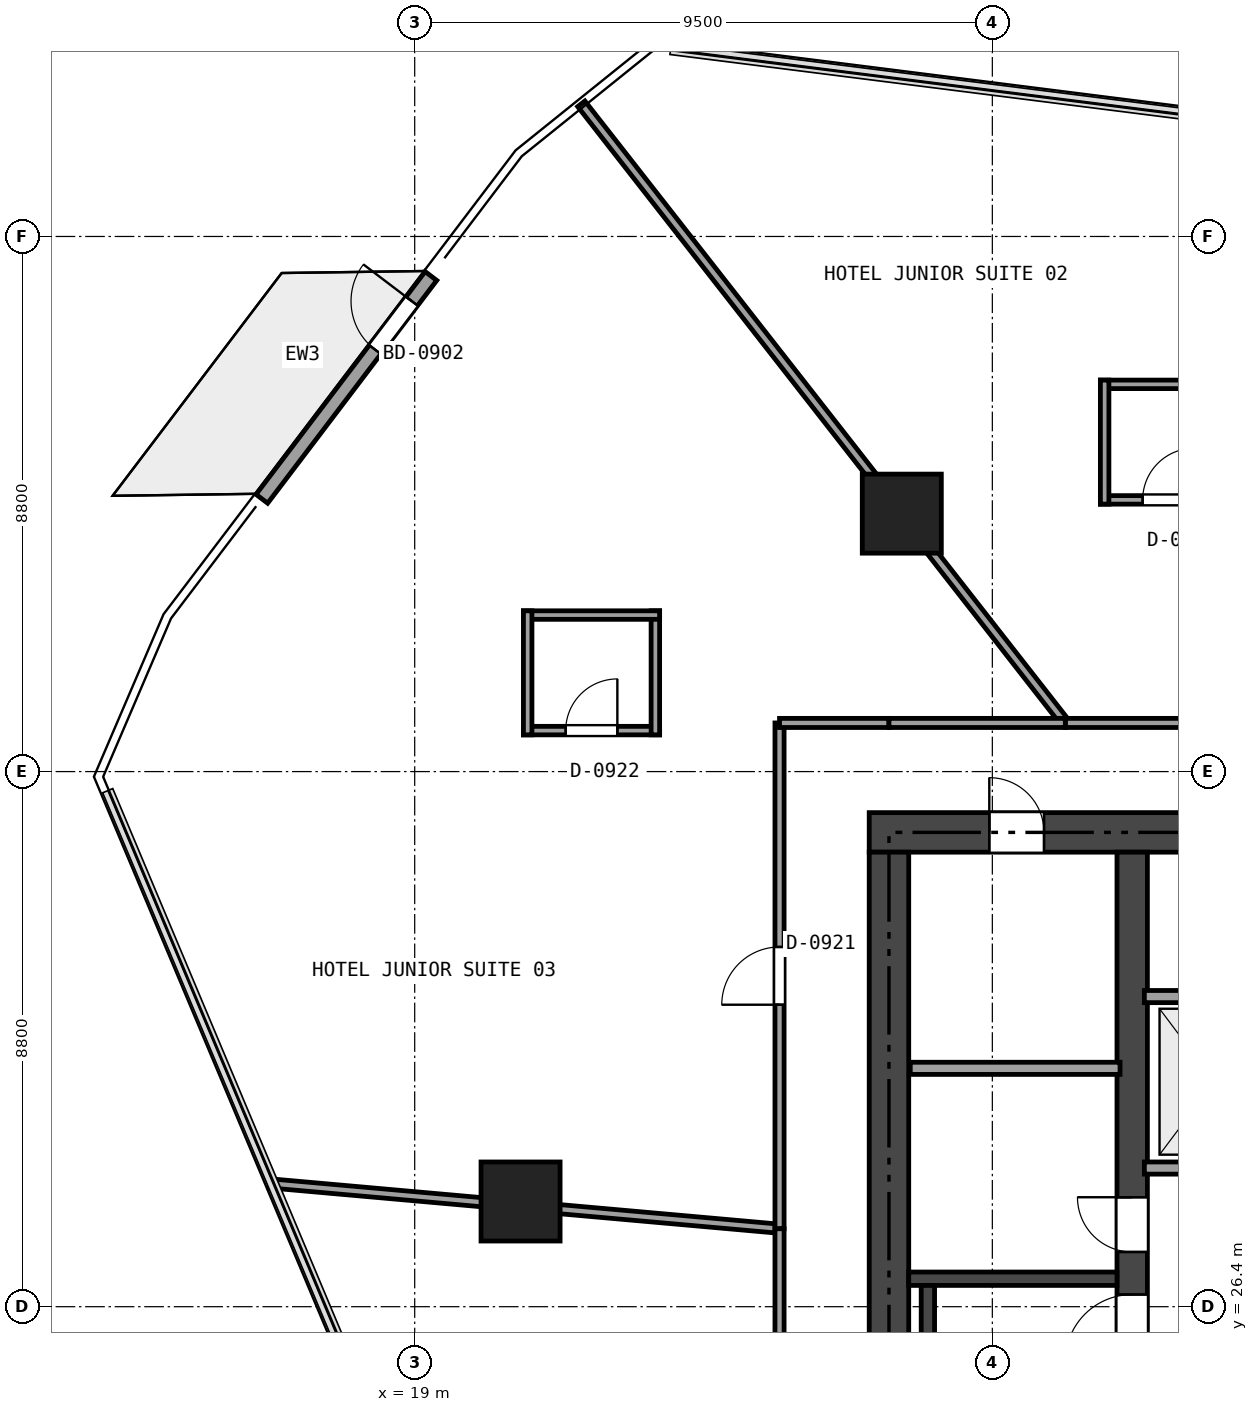
"""IFC4 building model, lengths in metres.
Left out: names, types, materials, properties, quantities, classifications, styles, units other than length and angle.
Written with IfcOpenShell. Run it as: python <this file> out.ifc"""

import sys

from ifc_helpers import new_model, si_unit, direction, frame, frame_2d, origin, origin_2d, place, context, subcontext, project, spatial, rectangle, extrude, element, fill, save


model = new_model("IFC4")
c1 = context("Model", 3, precision=1e-05, world=origin(), true_north=direction((0.0, 1.0)))
c2 = subcontext(c1, "Body", "Model", "MODEL_VIEW")
j1 = project(units=[si_unit("LENGTHUNIT", "METRE"), si_unit("PLANEANGLEUNIT", "RADIAN")], contexts=[c1])
p1 = place(None, origin())
s1 = spatial("IfcSite", under=j1, at=p1, CompositionType="ELEMENT")
p2 = place(p1, origin())
s2 = spatial("IfcBuilding", under=s1, at=p2, CompositionType="ELEMENT")
p3 = place(p2, frame((0.0, 0.0, 40.8)))
s3 = spatial("IfcBuildingStorey", under=s2, at=p3, CompositionType="ELEMENT", Elevation=40.8)
p4 = place(p3, frame((26.475, 34.2, 0.0), z_axis=(0.0, 0.0, 1.0), x_axis=(1.0, 0.0, 0.0)))
e1 = element("IfcWall", 1, at=p4, inside=s3, PredefinedType="SHEAR", context=c2, shape_type="SweptSolid", body=[
    extrude(rectangle(XDim=21.45, YDim=0.65, at=frame_2d((10.725, 0.0))), origin(), (0.0, 0.0, 1.0), 3.17),
])
p5 = place(p4, frame((9.725, 0.0, 0.0)))
e2 = element("IfcOpeningElement", 2, at=p5, cuts=e1, PredefinedType="OPENING", context=c2, shape_type="SweptSolid", body=[
    extrude(rectangle(XDim=1.1, YDim=2.15, at=frame_2d((0.55, 1.075))), frame((0.0, 0.335, 0.0), z_axis=(0.0, -1.0, 0.0), x_axis=(1.0, 0.0, 0.0)), (0.0, 0.0, 1.0), 0.67),
])
p6 = place(p4, frame((1.975, 0.0, 0.0)))
e3 = element("IfcOpeningElement", 3, at=p6, cuts=e1, PredefinedType="OPENING", context=c2, shape_type="SweptSolid", body=[
    extrude(rectangle(XDim=0.9, YDim=2.1, at=frame_2d((0.45, 1.05))), frame((0.0, 0.335, 0.0), z_axis=(0.0, -1.0, 0.0), x_axis=(1.0, 0.0, 0.0)), (0.0, 0.0, 1.0), 0.67),
])
p7 = place(p4, frame((6.275, 0.0, 0.0)))
e4 = element("IfcOpeningElement", 4, at=p7, cuts=e1, PredefinedType="OPENING", context=c2, shape_type="SweptSolid", body=[
    extrude(rectangle(XDim=0.9, YDim=2.1, at=frame_2d((0.45, 1.05))), frame((0.0, 0.335, 0.0), z_axis=(0.0, -1.0, 0.0), x_axis=(1.0, 0.0, 0.0)), (0.0, 0.0, 1.0), 0.67),
])
p8 = place(p3, frame((26.8, 18.925, 0.0), z_axis=(0.0, 0.0, 1.0), x_axis=(0.0, 1.0, 0.0)))
e5 = element("IfcWall", 5, at=p8, inside=s3, PredefinedType="SHEAR", context=c2, shape_type="SweptSolid", body=[
    extrude(rectangle(XDim=14.95, YDim=0.65, at=frame_2d((7.475, 0.0))), origin(), (0.0, 0.0, 1.0), 3.17),
])
p9 = place(p3, frame((30.8, 18.925, 0.0), z_axis=(0.0, 0.0, 1.0), x_axis=(0.0, 1.0, 0.0)))
e6 = element("IfcWall", 6, at=p9, inside=s3, PredefinedType="SHEAR", context=c2, shape_type="SweptSolid", body=[
    extrude(rectangle(XDim=14.95, YDim=0.5, at=frame_2d((7.475, 0.0))), origin(), (0.0, 0.0, 1.0), 3.17),
])
p10 = place(p9, frame((6.575, 0.0, 0.0)))
e7 = element("IfcOpeningElement", 7, at=p10, cuts=e6, PredefinedType="OPENING", context=c2, shape_type="SweptSolid", body=[
    extrude(rectangle(XDim=1.1, YDim=2.15, at=frame_2d((0.55, 1.075))), frame((0.0, 0.26, 0.0), z_axis=(0.0, -1.0, 0.0), x_axis=(1.0, 0.0, 0.0)), (0.0, 0.0, 1.0), 0.52),
])
p11 = place(p9, frame((8.375, 0.0, 0.0)))
e8 = element("IfcOpeningElement", 8, at=p11, cuts=e6, PredefinedType="OPENING", context=c2, shape_type="SweptSolid", body=[
    extrude(rectangle(XDim=0.9, YDim=2.1, at=frame_2d((0.45, 1.05))), frame((0.0, 0.26, 0.0), z_axis=(0.0, -1.0, 0.0), x_axis=(1.0, 0.0, 0.0)), (0.0, 0.0, 1.0), 0.52),
])
p12 = place(p3, frame((27.125, 26.86, 0.0), z_axis=(0.0, 0.0, 1.0), x_axis=(1.0, 0.0, 0.0)))
e9 = element("IfcWall", 9, at=p12, inside=s3, PredefinedType="SHEAR", context=c2, shape_type="SweptSolid", body=[
    extrude(rectangle(XDim=3.425, YDim=0.22, at=frame_2d((1.712, 0.0))), origin(), (0.0, 0.0, 1.0), 3.17),
])
p13 = place(p3, frame((27.44, 19.35, 0.0), z_axis=(0.0, 0.0, 1.0), x_axis=(0.0, 1.0, 0.0)))
e10 = element("IfcWall", 10, at=p13, inside=s3, PredefinedType="SHEAR", context=c2, shape_type="SweptSolid", body=[
    extrude(rectangle(XDim=7.4, YDim=0.22, at=frame_2d((3.7, 0.0))), origin(), (0.0, 0.0, 1.0), 3.17),
])
for number, where, z_axis, x_axis in (
    (11, (27.011, 39.442, 0.0), (0.0, 0.0, 1.0), (1.0, 0.0, 0.0)),
    (12, (20.741, 28.13, 0.0), (0.0, 0.0, 1.0), (1.0, 0.0, 0.0)),
):
    element("IfcColumn", number, at=place(p3, frame(where, z_axis=z_axis, x_axis=x_axis)), inside=s3, PredefinedType="COLUMN", context=c2, shape_type="SweptSolid", body=[
        extrude(rectangle(XDim=1.3, YDim=1.3, at=origin_2d()), origin(), (0.0, 0.0, 1.0), 3.17),
    ])
p14 = place(p3, frame((16.486, 39.686, 0.0), z_axis=(0.0, 0.0, 1.0), x_axis=(0.604575811397, 0.79654760578, 0.0)))
e13 = element("IfcWall", 13, at=p14, inside=s3, PredefinedType="SOLIDWALL", context=c2, shape_type="SweptSolid", body=[
    extrude(rectangle(XDim=4.6, YDim=0.24, at=frame_2d((2.3, 0.0))), origin(), (0.0, 0.0, 1.0), 3.17),
])
p15 = place(p14, frame((3.08, 0.0, 0.0)))
e14 = element("IfcOpeningElement", 14, at=p15, cuts=e13, PredefinedType="OPENING", context=c2, shape_type="SweptSolid", body=[
    extrude(rectangle(XDim=1.0, YDim=2.15, at=frame_2d((0.5, 1.075))), frame((0.0, 0.13, 0.0), z_axis=(0.0, -1.0, 0.0), x_axis=(1.0, 0.0, 0.0)), (0.0, 0.0, 1.0), 0.26),
])
p16 = place(p3, frame((27.15, 30.32, 0.0), z_axis=(0.0, 0.0, 1.0), x_axis=(1.0, 0.0, 0.0)))
e15 = element("IfcWall", 15, at=p16, inside=s3, PredefinedType="SOLIDWALL", context=c2, shape_type="SweptSolid", body=[
    extrude(rectangle(XDim=3.45, YDim=0.2, at=frame_2d((1.725, 0.0))), origin(), (0.0, 0.0, 1.0), 3.17),
])
p17 = place(p3, frame((31.0, 28.68, 0.0), z_axis=(0.0, 0.0, 1.0), x_axis=(1.0, 0.0, 0.0)))
e16 = element("IfcWall", 16, at=p17, inside=s3, PredefinedType="SOLIDWALL", context=c2, shape_type="SweptSolid", body=[
    extrude(rectangle(XDim=4.42, YDim=0.2, at=frame_2d((2.21, 0.0))), origin(), (0.0, 0.0, 1.0), 3.17),
])
p18 = place(p17, frame((0.6, 0.0, 0.0)))
e17 = element("IfcOpeningElement", 17, at=p18, cuts=e16, PredefinedType="OPENING", context=c2, shape_type="SweptSolid", body=[
    extrude(rectangle(XDim=1.1, YDim=2.15, at=frame_2d((0.55, 1.075))), frame((0.0, 0.11, 0.0), z_axis=(0.0, -1.0, 0.0), x_axis=(1.0, 0.0, 0.0)), (0.0, 0.0, 1.0), 0.22),
])
p19 = place(p17, frame((2.85, 0.0, 0.0)))
e18 = element("IfcOpeningElement", 18, at=p19, cuts=e16, PredefinedType="OPENING", context=c2, shape_type="SweptSolid", body=[
    extrude(rectangle(XDim=1.1, YDim=2.15, at=frame_2d((0.55, 1.075))), frame((0.0, 0.11, 0.0), z_axis=(0.0, -1.0, 0.0), x_axis=(1.0, 0.0, 0.0)), (0.0, 0.0, 1.0), 0.22),
])
p20 = place(p3, frame((31.0, 31.5, 0.0), z_axis=(0.0, 0.0, 1.0), x_axis=(1.0, 0.0, 0.0)))
e19 = element("IfcWall", 19, at=p20, inside=s3, PredefinedType="SOLIDWALL", context=c2, shape_type="SweptSolid", body=[
    extrude(rectangle(XDim=4.42, YDim=0.2, at=frame_2d((2.21, 0.0))), origin(), (0.0, 0.0, 1.0), 3.17),
])
p21 = place(p3, frame((30.277, 39.668, 0.0), z_axis=(0.0, 0.0, 1.0), x_axis=(1.0, 0.0, 0.0)))
e20 = element("IfcWall", 20, at=p21, inside=s3, PredefinedType="PARTITIONING", context=c2, shape_type="SweptSolid", body=[
    extrude(rectangle(XDim=2.24, YDim=0.14, at=frame_2d((1.12, 0.0))), origin(), (0.0, 0.0, 1.0), 3.17),
])
p22 = place(p21, frame((0.695, 0.0, 0.0)))
e21 = element("IfcOpeningElement", 21, at=p22, cuts=e20, PredefinedType="OPENING", context=c2, shape_type="SweptSolid", body=[
    extrude(rectangle(XDim=0.85, YDim=2.1, at=frame_2d((0.425, 1.05))), frame((0.0, 0.08, 0.0), z_axis=(0.0, -1.0, 0.0), x_axis=(1.0, 0.0, 0.0)), (0.0, 0.0, 1.0), 0.16),
])
p23 = place(p3, frame((32.517, 41.568, 0.0), z_axis=(0.0, 0.0, 1.0), x_axis=(-1.0, 0.0, 0.0)))
e22 = element("IfcWall", 22, at=p23, inside=s3, PredefinedType="PARTITIONING", context=c2, shape_type="SweptSolid", body=[
    extrude(rectangle(XDim=2.24, YDim=0.14, at=frame_2d((1.12, 0.0))), origin(), (0.0, 0.0, 1.0), 2.355),
])
p24 = place(p3, frame((30.347, 41.638, 0.0), z_axis=(0.0, 0.0, 1.0), x_axis=(0.0, -1.0, 0.0)))
e23 = element("IfcWall", 23, at=p24, inside=s3, PredefinedType="PARTITIONING", context=c2, shape_type="SweptSolid", body=[
    extrude(rectangle(XDim=2.04, YDim=0.14, at=frame_2d((1.02, 0.0))), origin(), (0.0, 0.0, 1.0), 2.355),
])
p25 = place(p3, frame((20.788, 35.874, 0.0), z_axis=(0.0, 0.0, 1.0), x_axis=(1.0, 0.0, 0.0)))
e24 = element("IfcWall", 24, at=p25, inside=s3, PredefinedType="PARTITIONING", context=c2, shape_type="SweptSolid", body=[
    extrude(rectangle(XDim=2.24, YDim=0.14, at=frame_2d((1.12, 0.0))), origin(), (0.0, 0.0, 1.0), 3.17),
])
p26 = place(p25, frame((0.695, 0.0, 0.0)))
e25 = element("IfcOpeningElement", 25, at=p26, cuts=e24, PredefinedType="OPENING", context=c2, shape_type="SweptSolid", body=[
    extrude(rectangle(XDim=0.85, YDim=2.1, at=frame_2d((0.425, 1.05))), frame((0.0, 0.08, 0.0), z_axis=(0.0, -1.0, 0.0), x_axis=(1.0, 0.0, 0.0)), (0.0, 0.0, 1.0), 0.16),
])
p27 = place(p3, frame((22.958, 35.804, 0.0), z_axis=(0.0, 0.0, 1.0), x_axis=(0.0, 1.0, 0.0)))
e26 = element("IfcWall", 26, at=p27, inside=s3, PredefinedType="PARTITIONING", context=c2, shape_type="SweptSolid", body=[
    extrude(rectangle(XDim=2.04, YDim=0.14, at=frame_2d((1.02, 0.0))), origin(), (0.0, 0.0, 1.0), 3.17),
])
p28 = place(p3, frame((23.028, 37.774, 0.0), z_axis=(0.0, 0.0, 1.0), x_axis=(-1.0, 0.0, 0.0)))
e27 = element("IfcWall", 27, at=p28, inside=s3, PredefinedType="PARTITIONING", context=c2, shape_type="SweptSolid", body=[
    extrude(rectangle(XDim=2.24, YDim=0.14, at=frame_2d((1.12, 0.0))), origin(), (0.0, 0.0, 1.0), 3.17),
])
p29 = place(p3, frame((20.858, 37.844, 0.0), z_axis=(0.0, 0.0, 1.0), x_axis=(0.0, -1.0, 0.0)))
e28 = element("IfcWall", 28, at=p29, inside=s3, PredefinedType="PARTITIONING", context=c2, shape_type="SweptSolid", body=[
    extrude(rectangle(XDim=2.04, YDim=0.14, at=frame_2d((1.02, 0.0))), origin(), (0.0, 0.0, 1.0), 3.17),
])
p30 = place(p3, frame((21.74, 46.182, 0.0), z_axis=(0.0, 0.0, 1.0), x_axis=(0.615901715435, -0.787822998474, 0.0)))
e29 = element("IfcWall", 29, at=p30, inside=s3, PredefinedType="PARTITIONING", context=c2, shape_type="SweptSolid", body=[
    extrude(rectangle(XDim=12.924, YDim=0.15, at=frame_2d((6.462, 0.0))), origin(), (0.0, 0.0, 1.0), 2.395),
])
p31 = place(p3, frame((29.7, 36.0, 0.0), z_axis=(0.0, 0.0, 1.0), x_axis=(1.0, 0.0, 0.0)))
e30 = element("IfcWall", 30, at=p31, inside=s3, PredefinedType="PARTITIONING", context=c2, shape_type="SweptSolid", body=[
    extrude(rectangle(XDim=7.165, YDim=0.15, at=frame_2d((3.583, 0.0))), origin(), (0.0, 0.0, 1.0), 2.395),
])
p32 = place(p31, frame((3.108, 0.0, 0.0)))
e31 = element("IfcOpeningElement", 31, at=p32, cuts=e30, PredefinedType="OPENING", context=c2, shape_type="SweptSolid", body=[
    extrude(rectangle(XDim=0.95, YDim=2.15, at=frame_2d((0.475, 1.075))), frame((0.0, 0.085, 0.0), z_axis=(0.0, -1.0, 0.0), x_axis=(1.0, 0.0, 0.0)), (0.0, 0.0, 1.0), 0.17),
])
p33 = place(p3, frame((16.612, 28.429, 0.0), z_axis=(0.0, 0.0, 1.0), x_axis=(0.99605717102, -0.088713652045, 0.0)))
e32 = element("IfcWall", 32, at=p33, inside=s3, PredefinedType="PARTITIONING", context=c2, shape_type="SweptSolid", body=[
    extrude(rectangle(XDim=8.421, YDim=0.15, at=frame_2d((4.21, 0.0))), origin(), (0.0, 0.0, 1.0), 2.395),
])
p34 = place(p3, frame((25.0, 27.682, 0.0), z_axis=(0.0, 0.0, 1.0), x_axis=(0.0, 1.0, 0.0)))
e33 = element("IfcWall", 33, at=p34, inside=s3, PredefinedType="PARTITIONING", context=c2, shape_type="SweptSolid", body=[
    extrude(rectangle(XDim=8.318, YDim=0.15, at=frame_2d((4.159, 0.0))), origin(), (0.0, 0.0, 1.0), 2.355),
])
p35 = place(p34, frame((3.684, 0.0, 0.0)))
e34 = element("IfcOpeningElement", 34, at=p35, cuts=e33, PredefinedType="OPENING", context=c2, shape_type="SweptSolid", body=[
    extrude(rectangle(XDim=0.95, YDim=2.15, at=frame_2d((0.475, 1.075))), frame((0.0, 0.085, 0.0), z_axis=(0.0, -1.0, 0.0), x_axis=(1.0, 0.0, 0.0)), (0.0, 0.0, 1.0), 0.17),
])
p36 = place(p3, frame((25.0, 36.0, 0.0), z_axis=(0.0, 0.0, 1.0), x_axis=(1.0, 0.0, 0.0)))
e35 = element("IfcWall", 35, at=p36, inside=s3, PredefinedType="PARTITIONING", context=c2, shape_type="SweptSolid", body=[
    extrude(rectangle(XDim=1.8, YDim=0.15, at=frame_2d((0.9, 0.0))), origin(), (0.0, 0.0, 1.0), 2.355),
])
p37 = place(p3, frame((26.8, 36.0, 0.0), z_axis=(0.0, 0.0, 1.0), x_axis=(1.0, 0.0, 0.0)))
e36 = element("IfcWall", 36, at=p37, inside=s3, PredefinedType="PARTITIONING", context=c2, shape_type="SweptSolid", body=[
    extrude(rectangle(XDim=2.9, YDim=0.15, at=frame_2d((1.45, 0.0))), origin(), (0.0, 0.0, 1.0), 2.395),
])
p38 = place(p3, frame((25.0, 18.6, 0.0), z_axis=(0.0, 0.0, 1.0), x_axis=(0.0, 1.0, 0.0)))
e37 = element("IfcWall", 37, at=p38, inside=s3, PredefinedType="PARTITIONING", context=c2, shape_type="SweptSolid", body=[
    extrude(rectangle(XDim=9.082, YDim=0.15, at=frame_2d((4.541, 0.0))), origin(), (0.0, 0.0, 1.0), 2.395),
])
p39 = place(p38, frame((4.066, 0.0, 0.0)))
e38 = element("IfcOpeningElement", 38, at=p39, cuts=e37, PredefinedType="OPENING", context=c2, shape_type="SweptSolid", body=[
    extrude(rectangle(XDim=0.95, YDim=2.15, at=frame_2d((0.475, 1.075))), frame((0.0, 0.085, 0.0), z_axis=(0.0, -1.0, 0.0), x_axis=(1.0, 0.0, 0.0)), (0.0, 0.0, 1.0), 0.17),
])
p40 = place(p15, origin())
e39 = element("IfcDoor", 39, at=p40, inside=s3, OperationType="SINGLE_SWING_RIGHT", PredefinedType="DOOR", context=c2, shape_type="SweptSolid", body=[
    extrude(rectangle(XDim=1.0, YDim=2.15, at=frame_2d((0.5, 1.075))), frame((0.0, 0.025, 0.0), z_axis=(0.0, -1.0, 0.0), x_axis=(1.0, 0.0, 0.0)), (0.0, 0.0, 1.0), 0.05),
])
fill(e14, e39)
p41 = place(p10, origin())
e40 = element("IfcDoor", 40, at=p41, inside=s3, OperationType="SINGLE_SWING_LEFT", PredefinedType="DOOR", context=c2, shape_type="SweptSolid", body=[
    extrude(rectangle(XDim=1.1, YDim=2.15, at=frame_2d((0.55, 1.075))), frame((0.0, 0.025, 0.0), z_axis=(0.0, -1.0, 0.0), x_axis=(1.0, 0.0, 0.0)), (0.0, 0.0, 1.0), 0.05),
])
fill(e7, e40)
p42 = place(p11, origin())
e41 = element("IfcDoor", 41, at=p42, inside=s3, OperationType="SINGLE_SWING_RIGHT", PredefinedType="DOOR", context=c2, shape_type="SweptSolid", body=[
    extrude(rectangle(XDim=0.9, YDim=2.1, at=frame_2d((0.45, 1.05))), frame((0.0, 0.025, 0.0), z_axis=(0.0, -1.0, 0.0), x_axis=(1.0, 0.0, 0.0)), (0.0, 0.0, 1.0), 0.05),
])
fill(e8, e41)
p43 = place(p6, origin())
e42 = element("IfcDoor", 42, at=p43, inside=s3, OperationType="SINGLE_SWING_LEFT", PredefinedType="DOOR", context=c2, shape_type="SweptSolid", body=[
    extrude(rectangle(XDim=0.9, YDim=2.1, at=frame_2d((0.45, 1.05))), frame((0.0, 0.025, 0.0), z_axis=(0.0, -1.0, 0.0), x_axis=(1.0, 0.0, 0.0)), (0.0, 0.0, 1.0), 0.05),
])
fill(e3, e42)
p44 = place(p22, origin())
e43 = element("IfcDoor", 43, at=p44, inside=s3, OperationType="SINGLE_SWING_RIGHT", PredefinedType="DOOR", context=c2, shape_type="SweptSolid", body=[
    extrude(rectangle(XDim=0.85, YDim=2.1, at=frame_2d((0.425, 1.05))), frame((0.0, 0.025, 0.0), z_axis=(0.0, -1.0, 0.0), x_axis=(1.0, 0.0, 0.0)), (0.0, 0.0, 1.0), 0.05),
])
fill(e21, e43)
p45 = place(p35, origin())
e44 = element("IfcDoor", 44, at=p45, inside=s3, OperationType="SINGLE_SWING_LEFT", PredefinedType="DOOR", context=c2, shape_type="SweptSolid", body=[
    extrude(rectangle(XDim=0.95, YDim=2.15, at=frame_2d((0.475, 1.075))), frame((0.0, 0.025, 0.0), z_axis=(0.0, -1.0, 0.0), x_axis=(1.0, 0.0, 0.0)), (0.0, 0.0, 1.0), 0.05),
])
fill(e34, e44)
p46 = place(p26, origin())
e45 = element("IfcDoor", 45, at=p46, inside=s3, OperationType="SINGLE_SWING_RIGHT", PredefinedType="DOOR", context=c2, shape_type="SweptSolid", body=[
    extrude(rectangle(XDim=0.85, YDim=2.1, at=frame_2d((0.425, 1.05))), frame((0.0, 0.025, 0.0), z_axis=(0.0, -1.0, 0.0), x_axis=(1.0, 0.0, 0.0)), (0.0, 0.0, 1.0), 0.05),
])
fill(e25, e45)
save(model, sys.argv[1])
